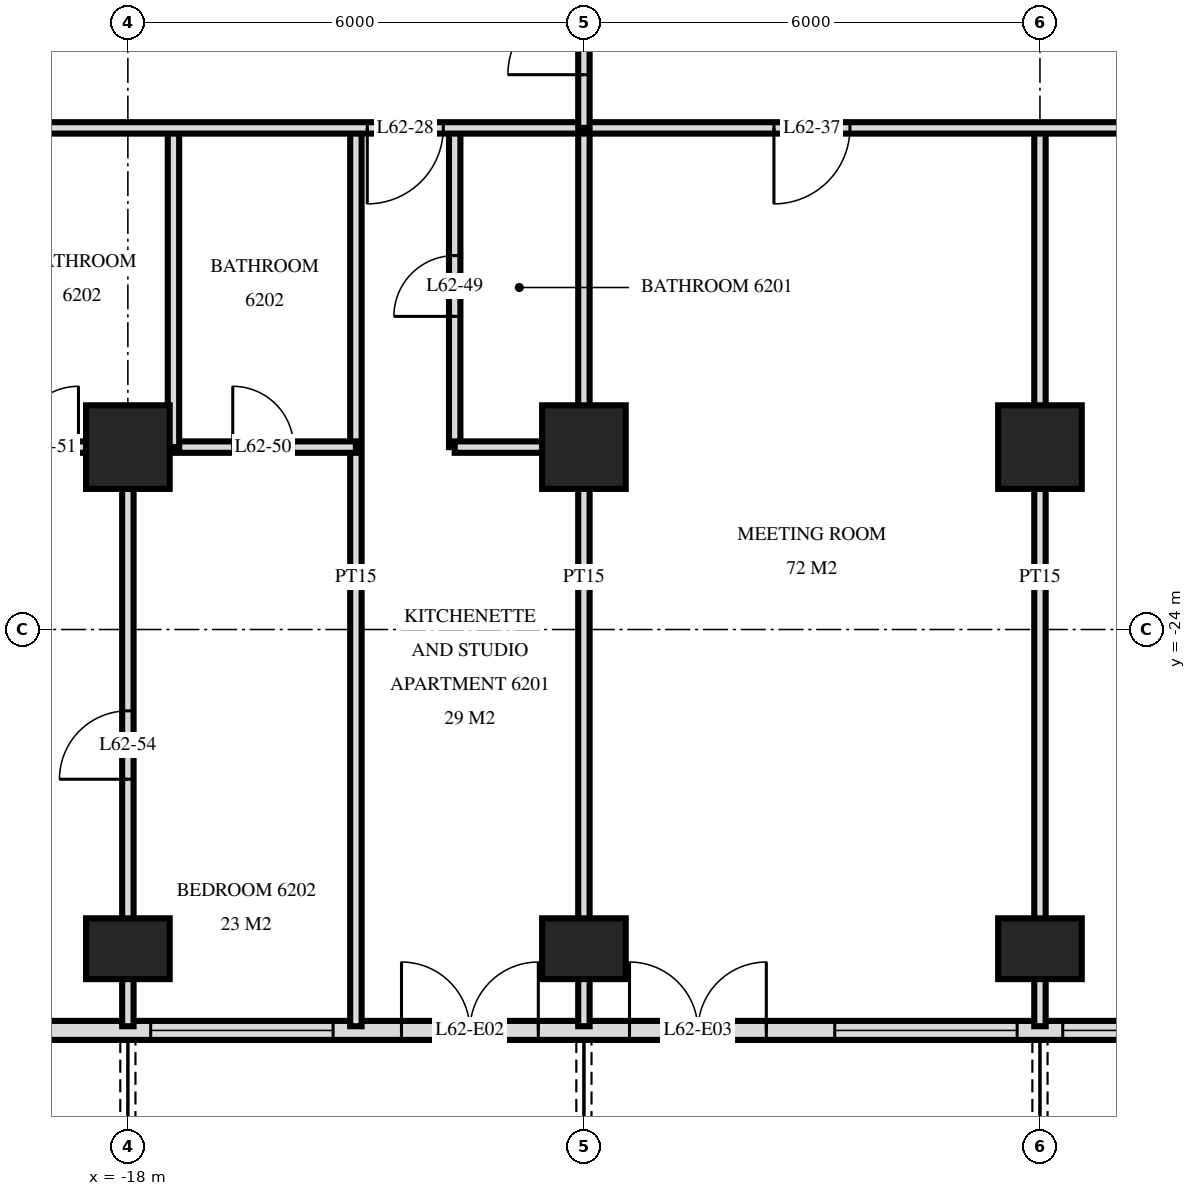
"""IFC4 building model, lengths in metres.
Left out: names, types, materials, properties, quantities, classifications, styles, units other than length and angle.
Written with IfcOpenShell. Run it as: python <this file> out.ifc"""

import sys

from ifc_helpers import new_model, si_unit, direction, frame, frame_2d, origin, origin_2d, place, context, subcontext, project, spatial, rectangle, extrude, element, fill, save


model = new_model("IFC4")
c1 = context("Model", 3, precision=1e-05, world=origin(), true_north=direction((0.0, 1.0)))
c2 = subcontext(c1, "Body", "Model", "MODEL_VIEW")
j1 = project(units=[si_unit("LENGTHUNIT", "METRE"), si_unit("PLANEANGLEUNIT", "RADIAN")], contexts=[c1])
p1 = place(None, origin())
s1 = spatial("IfcSite", under=j1, at=p1, CompositionType="ELEMENT")
p2 = place(p1, origin())
s2 = spatial("IfcBuilding", under=s1, at=p2, CompositionType="ELEMENT")
p3 = place(p2, frame((0.0, 0.0, 236.1)))
s3 = spatial("IfcBuildingStorey", under=s2, at=p3, CompositionType="ELEMENT", Elevation=236.1)
p4 = place(p3, frame((-18.0, -28.2, 0.0), z_axis=(0.0, 0.0, 1.0), x_axis=(1.0, 0.0, 0.0)))
e1 = element("IfcColumn", 1, at=p4, inside=s3, PredefinedType="COLUMN", context=c2, shape_type="SweptSolid", body=[
    extrude(rectangle(XDim=1.1, YDim=0.8, at=origin_2d()), origin(), (0.0, 0.0, 1.0), 3.5),
])
p5 = place(p3, frame((-18.0, -21.6, 0.0), z_axis=(0.0, 0.0, 1.0), x_axis=(1.0, 0.0, 0.0)))
e2 = element("IfcColumn", 2, at=p5, inside=s3, PredefinedType="COLUMN", context=c2, shape_type="SweptSolid", body=[
    extrude(rectangle(XDim=1.1, YDim=1.1, at=origin_2d()), origin(), (0.0, 0.0, 1.0), 3.5),
])
p6 = place(p3, frame((-12.0, -28.2, 0.0), z_axis=(0.0, 0.0, 1.0), x_axis=(1.0, 0.0, 0.0)))
e3 = element("IfcColumn", 3, at=p6, inside=s3, PredefinedType="COLUMN", context=c2, shape_type="SweptSolid", body=[
    extrude(rectangle(XDim=1.1, YDim=0.8, at=origin_2d()), origin(), (0.0, 0.0, 1.0), 3.5),
])
p7 = place(p3, frame((-12.0, -21.6, 0.0), z_axis=(0.0, 0.0, 1.0), x_axis=(1.0, 0.0, 0.0)))
e4 = element("IfcColumn", 4, at=p7, inside=s3, PredefinedType="COLUMN", context=c2, shape_type="SweptSolid", body=[
    extrude(rectangle(XDim=1.1, YDim=1.1, at=origin_2d()), origin(), (0.0, 0.0, 1.0), 3.5),
])
p8 = place(p3, frame((-6.0, -28.2, 0.0), z_axis=(0.0, 0.0, 1.0), x_axis=(1.0, 0.0, 0.0)))
e5 = element("IfcColumn", 5, at=p8, inside=s3, PredefinedType="COLUMN", context=c2, shape_type="SweptSolid", body=[
    extrude(rectangle(XDim=1.1, YDim=0.8, at=origin_2d()), origin(), (0.0, 0.0, 1.0), 3.5),
])
p9 = place(p3, frame((-6.0, -21.6, 0.0), z_axis=(0.0, 0.0, 1.0), x_axis=(1.0, 0.0, 0.0)))
e6 = element("IfcColumn", 6, at=p9, inside=s3, PredefinedType="COLUMN", context=c2, shape_type="SweptSolid", body=[
    extrude(rectangle(XDim=1.1, YDim=1.1, at=origin_2d()), origin(), (0.0, 0.0, 1.0), 3.5),
])
p10 = place(p3, frame((-22.475, -29.275, 0.0), z_axis=(0.0, 0.0, 1.0), x_axis=(1.0, 0.0, 0.0)))
e7 = element("IfcWall", 7, at=p10, inside=s3, PredefinedType="SOLIDWALL", context=c2, shape_type="SweptSolid", body=[
    extrude(rectangle(XDim=44.951, YDim=0.25, at=frame_2d((22.475, 0.0))), origin(), (0.0, 0.0, 1.0), 3.22),
])
p11 = place(p10, frame((0.575, 0.0, 0.0)))
e8 = element("IfcOpeningElement", 8, at=p11, cuts=e7, PredefinedType="OPENING", context=c2, shape_type="SweptSolid", body=[
    extrude(rectangle(XDim=1.8, YDim=2.4, at=frame_2d((0.9, 1.2))), frame((0.0, 0.135, 0.0), z_axis=(0.0, -1.0, 0.0), x_axis=(1.0, 0.0, 0.0)), (0.0, 0.0, 1.0), 0.27),
])
p12 = place(p10, frame((4.775, 0.0, 0.9)))
e9 = element("IfcOpeningElement", 9, at=p12, cuts=e7, PredefinedType="OPENING", context=c2, shape_type="SweptSolid", body=[
    extrude(rectangle(XDim=2.4, YDim=1.5, at=frame_2d((1.2, 0.75))), frame((0.0, 0.135, 0.0), z_axis=(0.0, -1.0, 0.0), x_axis=(1.0, 0.0, 0.0)), (0.0, 0.0, 1.0), 0.27),
])
p13 = place(p10, frame((8.075, 0.0, 0.0)))
e10 = element("IfcOpeningElement", 10, at=p13, cuts=e7, PredefinedType="OPENING", context=c2, shape_type="SweptSolid", body=[
    extrude(rectangle(XDim=1.8, YDim=2.4, at=frame_2d((0.9, 1.2))), frame((0.0, 0.135, 0.0), z_axis=(0.0, -1.0, 0.0), x_axis=(1.0, 0.0, 0.0)), (0.0, 0.0, 1.0), 0.27),
])
p14 = place(p10, frame((11.075, 0.0, 0.0)))
e11 = element("IfcOpeningElement", 11, at=p14, cuts=e7, PredefinedType="OPENING", context=c2, shape_type="SweptSolid", body=[
    extrude(rectangle(XDim=1.8, YDim=2.4, at=frame_2d((0.9, 1.2))), frame((0.0, 0.135, 0.0), z_axis=(0.0, -1.0, 0.0), x_axis=(1.0, 0.0, 0.0)), (0.0, 0.0, 1.0), 0.27),
])
p15 = place(p10, frame((13.775, 0.0, 0.9)))
e12 = element("IfcOpeningElement", 12, at=p15, cuts=e7, PredefinedType="OPENING", context=c2, shape_type="SweptSolid", body=[
    extrude(rectangle(XDim=2.4, YDim=1.5, at=frame_2d((1.2, 0.75))), frame((0.0, 0.135, 0.0), z_axis=(0.0, -1.0, 0.0), x_axis=(1.0, 0.0, 0.0)), (0.0, 0.0, 1.0), 0.27),
])
p16 = place(p10, frame((16.775, 0.0, 0.9)))
e13 = element("IfcOpeningElement", 13, at=p16, cuts=e7, PredefinedType="OPENING", context=c2, shape_type="SweptSolid", body=[
    extrude(rectangle(XDim=2.4, YDim=1.5, at=frame_2d((1.2, 0.75))), frame((0.0, 0.135, 0.0), z_axis=(0.0, -1.0, 0.0), x_axis=(1.0, 0.0, 0.0)), (0.0, 0.0, 1.0), 0.27),
])
p17 = place(p10, frame((20.075, 0.0, 0.0)))
e14 = element("IfcOpeningElement", 14, at=p17, cuts=e7, PredefinedType="OPENING", context=c2, shape_type="SweptSolid", body=[
    extrude(rectangle(XDim=1.8, YDim=2.4, at=frame_2d((0.9, 1.2))), frame((0.0, 0.135, 0.0), z_axis=(0.0, -1.0, 0.0), x_axis=(1.0, 0.0, 0.0)), (0.0, 0.0, 1.0), 0.27),
])
p18 = place(p10, frame((23.075, 0.0, 0.0)))
e15 = element("IfcOpeningElement", 15, at=p18, cuts=e7, PredefinedType="OPENING", context=c2, shape_type="SweptSolid", body=[
    extrude(rectangle(XDim=1.8, YDim=2.4, at=frame_2d((0.9, 1.2))), frame((0.0, 0.135, 0.0), z_axis=(0.0, -1.0, 0.0), x_axis=(1.0, 0.0, 0.0)), (0.0, 0.0, 1.0), 0.27),
])
p19 = place(p10, frame((25.775, 0.0, 0.9)))
e16 = element("IfcOpeningElement", 16, at=p19, cuts=e7, PredefinedType="OPENING", context=c2, shape_type="SweptSolid", body=[
    extrude(rectangle(XDim=2.4, YDim=1.5, at=frame_2d((1.2, 0.75))), frame((0.0, 0.135, 0.0), z_axis=(0.0, -1.0, 0.0), x_axis=(1.0, 0.0, 0.0)), (0.0, 0.0, 1.0), 0.27),
])
p20 = place(p10, frame((29.075, 0.0, 0.0)))
e17 = element("IfcOpeningElement", 17, at=p20, cuts=e7, PredefinedType="OPENING", context=c2, shape_type="SweptSolid", body=[
    extrude(rectangle(XDim=1.8, YDim=2.4, at=frame_2d((0.9, 1.2))), frame((0.0, 0.135, 0.0), z_axis=(0.0, -1.0, 0.0), x_axis=(1.0, 0.0, 0.0)), (0.0, 0.0, 1.0), 0.27),
])
p21 = place(p10, frame((31.775, 0.0, 0.9)))
e18 = element("IfcOpeningElement", 18, at=p21, cuts=e7, PredefinedType="OPENING", context=c2, shape_type="SweptSolid", body=[
    extrude(rectangle(XDim=2.4, YDim=1.5, at=frame_2d((1.2, 0.75))), frame((0.0, 0.135, 0.0), z_axis=(0.0, -1.0, 0.0), x_axis=(1.0, 0.0, 0.0)), (0.0, 0.0, 1.0), 0.27),
])
p22 = place(p10, frame((35.075, 0.0, 0.0)))
e19 = element("IfcOpeningElement", 19, at=p22, cuts=e7, PredefinedType="OPENING", context=c2, shape_type="SweptSolid", body=[
    extrude(rectangle(XDim=1.8, YDim=2.4, at=frame_2d((0.9, 1.2))), frame((0.0, 0.135, 0.0), z_axis=(0.0, -1.0, 0.0), x_axis=(1.0, 0.0, 0.0)), (0.0, 0.0, 1.0), 0.27),
])
p23 = place(p10, frame((41.075, 0.0, 0.0)))
e20 = element("IfcOpeningElement", 20, at=p23, cuts=e7, PredefinedType="OPENING", context=c2, shape_type="SweptSolid", body=[
    extrude(rectangle(XDim=1.8, YDim=2.4, at=frame_2d((0.9, 1.2))), frame((0.0, 0.135, 0.0), z_axis=(0.0, -1.0, 0.0), x_axis=(1.0, 0.0, 0.0)), (0.0, 0.0, 1.0), 0.27),
])
p24 = place(p3, frame((-6.0, -29.22, 0.0), z_axis=(0.0, 0.0, 1.0), x_axis=(0.0, 1.0, 0.0)))
e21 = element("IfcWall", 21, at=p24, inside=s3, PredefinedType="PARTITIONING", context=c2, shape_type="SweptSolid", body=[
    extrude(rectangle(XDim=11.82, YDim=0.15, at=frame_2d((5.91, 0.0))), origin(), (0.0, 0.0, 1.0), 3.22),
])
p25 = place(p3, frame((-12.0, -17.4, 0.0), z_axis=(0.0, 0.0, 1.0), x_axis=(0.0, 1.0, 0.0)))
e22 = element("IfcWall", 22, at=p25, inside=s3, PredefinedType="PARTITIONING", context=c2, shape_type="SweptSolid", body=[
    extrude(rectangle(XDim=2.35, YDim=0.15, at=frame_2d((1.175, 0.0))), origin(), (0.0, 0.0, 1.0), 3.22),
])
p26 = place(p25, frame((0.7, 0.0, 0.0)))
e23 = element("IfcOpeningElement", 23, at=p26, cuts=e22, PredefinedType="OPENING", context=c2, shape_type="SweptSolid", body=[
    extrude(rectangle(XDim=1.0, YDim=2.1, at=frame_2d((0.5, 1.05))), frame((0.0, 0.085, 0.0), z_axis=(0.0, -1.0, 0.0), x_axis=(1.0, 0.0, 0.0)), (0.0, 0.0, 1.0), 0.17),
])
p27 = place(p3, frame((-12.0, -29.22, 0.0), z_axis=(0.0, 0.0, 1.0), x_axis=(0.0, 1.0, 0.0)))
e24 = element("IfcWall", 24, at=p27, inside=s3, PredefinedType="PARTITIONING", context=c2, shape_type="SweptSolid", body=[
    extrude(rectangle(XDim=11.82, YDim=0.15, at=frame_2d((5.91, 0.0))), origin(), (0.0, 0.0, 1.0), 3.22),
])
p28 = place(p3, frame((-13.7, -21.6, 0.0), z_axis=(0.0, 0.0, 1.0), x_axis=(0.0, 1.0, 0.0)))
e25 = element("IfcWall", 25, at=p28, inside=s3, PredefinedType="PARTITIONING", context=c2, shape_type="SweptSolid", body=[
    extrude(rectangle(XDim=4.2, YDim=0.15, at=frame_2d((2.1, 0.0))), origin(), (0.0, 0.0, 1.0), 3.22),
])
p29 = place(p28, frame((1.72, 0.0, 0.0)))
e26 = element("IfcOpeningElement", 26, at=p29, cuts=e25, PredefinedType="OPENING", context=c2, shape_type="SweptSolid", body=[
    extrude(rectangle(XDim=0.8, YDim=2.1, at=frame_2d((0.4, 1.05))), frame((0.0, 0.085, 0.0), z_axis=(0.0, -1.0, 0.0), x_axis=(1.0, 0.0, 0.0)), (0.0, 0.0, 1.0), 0.17),
])
p30 = place(p3, frame((-15.0, -29.22, 0.0), z_axis=(0.0, 0.0, 1.0), x_axis=(0.0, 1.0, 0.0)))
e27 = element("IfcWall", 27, at=p30, inside=s3, PredefinedType="PARTITIONING", context=c2, shape_type="SweptSolid", body=[
    extrude(rectangle(XDim=11.82, YDim=0.15, at=frame_2d((5.91, 0.0))), origin(), (0.0, 0.0, 1.0), 3.22),
])
p31 = place(p3, frame((-17.4, -21.6, 0.0), z_axis=(0.0, 0.0, 1.0), x_axis=(0.0, 1.0, 0.0)))
e28 = element("IfcWall", 28, at=p31, inside=s3, PredefinedType="PARTITIONING", context=c2, shape_type="SweptSolid", body=[
    extrude(rectangle(XDim=4.2, YDim=0.15, at=frame_2d((2.1, 0.0))), origin(), (0.0, 0.0, 1.0), 3.22),
])
p32 = place(p3, frame((-18.0, -29.22, 0.0), z_axis=(0.0, 0.0, 1.0), x_axis=(0.0, 1.0, 0.0)))
e29 = element("IfcWall", 29, at=p32, inside=s3, PredefinedType="PARTITIONING", context=c2, shape_type="SweptSolid", body=[
    extrude(rectangle(XDim=7.62, YDim=0.15, at=frame_2d((3.81, 0.0))), origin(), (0.0, 0.0, 1.0), 3.22),
])
p33 = place(p32, frame((3.25, 0.0, 0.0)))
e30 = element("IfcOpeningElement", 30, at=p33, cuts=e29, PredefinedType="OPENING", context=c2, shape_type="SweptSolid", body=[
    extrude(rectangle(XDim=0.9, YDim=2.1, at=frame_2d((0.45, 1.05))), frame((0.0, 0.085, 0.0), z_axis=(0.0, -1.0, 0.0), x_axis=(1.0, 0.0, 0.0)), (0.0, 0.0, 1.0), 0.17),
])
p34 = place(p3, frame((-21.4, -21.6, 0.0), z_axis=(0.0, 0.0, 1.0), x_axis=(1.0, 0.0, 0.0)))
e31 = element("IfcWall", 31, at=p34, inside=s3, PredefinedType="PARTITIONING", context=c2, shape_type="SweptSolid", body=[
    extrude(rectangle(XDim=6.4, YDim=0.15, at=frame_2d((3.2, 0.0))), origin(), (0.0, 0.0, 1.0), 3.22),
])
p35 = place(p34, frame((4.78, 0.0, 0.0)))
e32 = element("IfcOpeningElement", 32, at=p35, cuts=e31, PredefinedType="OPENING", context=c2, shape_type="SweptSolid", body=[
    extrude(rectangle(XDim=0.8, YDim=2.1, at=frame_2d((0.4, 1.05))), frame((0.0, 0.085, 0.0), z_axis=(0.0, -1.0, 0.0), x_axis=(1.0, 0.0, 0.0)), (0.0, 0.0, 1.0), 0.17),
])
p36 = place(p34, frame((1.95, 0.0, 0.0)))
e33 = element("IfcOpeningElement", 33, at=p36, cuts=e31, PredefinedType="OPENING", context=c2, shape_type="SweptSolid", body=[
    extrude(rectangle(XDim=0.8, YDim=2.1, at=frame_2d((0.4, 1.05))), frame((0.0, 0.085, 0.0), z_axis=(0.0, -1.0, 0.0), x_axis=(1.0, 0.0, 0.0)), (0.0, 0.0, 1.0), 0.17),
])
p37 = place(p3, frame((-13.7, -21.6, 0.0), z_axis=(0.0, 0.0, 1.0), x_axis=(1.0, 0.0, 0.0)))
e34 = element("IfcWall", 34, at=p37, inside=s3, PredefinedType="PARTITIONING", context=c2, shape_type="SweptSolid", body=[
    extrude(rectangle(XDim=1.7, YDim=0.15, at=frame_2d((0.85, 0.0))), origin(), (0.0, 0.0, 1.0), 3.22),
])
p38 = place(p3, frame((-26.82, -17.4, 0.0), z_axis=(0.0, 0.0, 1.0), x_axis=(1.0, 0.0, 0.0)))
e35 = element("IfcWall", 35, at=p38, inside=s3, PredefinedType="PARTITIONING", context=c2, shape_type="SweptSolid", body=[
    extrude(rectangle(XDim=53.64, YDim=0.15, at=frame_2d((26.82, 0.0))), origin(), (0.0, 0.0, 1.0), 3.22),
])
p39 = place(p38, frame((11.97, 0.0, 0.0)))
e36 = element("IfcOpeningElement", 36, at=p39, cuts=e35, PredefinedType="OPENING", context=c2, shape_type="SweptSolid", body=[
    extrude(rectangle(XDim=1.0, YDim=2.1, at=frame_2d((0.5, 1.05))), frame((0.0, 0.085, 0.0), z_axis=(0.0, -1.0, 0.0), x_axis=(1.0, 0.0, 0.0)), (0.0, 0.0, 1.0), 0.17),
])
p40 = place(p38, frame((3.92, 0.0, 0.0)))
e37 = element("IfcOpeningElement", 37, at=p40, cuts=e35, PredefinedType="OPENING", context=c2, shape_type="SweptSolid", body=[
    extrude(rectangle(XDim=1.0, YDim=2.1, at=frame_2d((0.5, 1.05))), frame((0.0, 0.085, 0.0), z_axis=(0.0, -1.0, 0.0), x_axis=(1.0, 0.0, 0.0)), (0.0, 0.0, 1.0), 0.17),
])
p41 = place(p38, frame((5.72, 0.0, 0.0)))
e38 = element("IfcOpeningElement", 38, at=p41, cuts=e35, PredefinedType="OPENING", context=c2, shape_type="SweptSolid", body=[
    extrude(rectangle(XDim=1.0, YDim=2.1, at=frame_2d((0.5, 1.05))), frame((0.0, 0.085, 0.0), z_axis=(0.0, -1.0, 0.0), x_axis=(1.0, 0.0, 0.0)), (0.0, 0.0, 1.0), 0.17),
])
p42 = place(p38, frame((47.72, 0.0, 0.0)))
e39 = element("IfcOpeningElement", 39, at=p42, cuts=e35, PredefinedType="OPENING", context=c2, shape_type="SweptSolid", body=[
    extrude(rectangle(XDim=1.0, YDim=2.1, at=frame_2d((0.5, 1.05))), frame((0.0, 0.085, 0.0), z_axis=(0.0, -1.0, 0.0), x_axis=(1.0, 0.0, 0.0)), (0.0, 0.0, 1.0), 0.17),
])
p43 = place(p38, frame((51.02, 0.0, 0.0)))
e40 = element("IfcOpeningElement", 40, at=p43, cuts=e35, PredefinedType="OPENING", context=c2, shape_type="SweptSolid", body=[
    extrude(rectangle(XDim=1.0, YDim=2.1, at=frame_2d((0.5, 1.05))), frame((0.0, 0.085, 0.0), z_axis=(0.0, -1.0, 0.0), x_axis=(1.0, 0.0, 0.0)), (0.0, 0.0, 1.0), 0.17),
])
p44 = place(p38, frame((17.32, 0.0, 0.0)))
e41 = element("IfcOpeningElement", 41, at=p44, cuts=e35, PredefinedType="OPENING", context=c2, shape_type="SweptSolid", body=[
    extrude(rectangle(XDim=1.0, YDim=2.1, at=frame_2d((0.5, 1.05))), frame((0.0, 0.085, 0.0), z_axis=(0.0, -1.0, 0.0), x_axis=(1.0, 0.0, 0.0)), (0.0, 0.0, 1.0), 0.17),
])
p45 = place(p38, frame((23.32, 0.0, 0.0)))
e42 = element("IfcOpeningElement", 42, at=p45, cuts=e35, PredefinedType="OPENING", context=c2, shape_type="SweptSolid", body=[
    extrude(rectangle(XDim=1.0, YDim=2.1, at=frame_2d((0.5, 1.05))), frame((0.0, 0.085, 0.0), z_axis=(0.0, -1.0, 0.0), x_axis=(1.0, 0.0, 0.0)), (0.0, 0.0, 1.0), 0.17),
])
p46 = place(p38, frame((29.32, 0.0, 0.0)))
e43 = element("IfcOpeningElement", 43, at=p46, cuts=e35, PredefinedType="OPENING", context=c2, shape_type="SweptSolid", body=[
    extrude(rectangle(XDim=1.0, YDim=2.1, at=frame_2d((0.5, 1.05))), frame((0.0, 0.085, 0.0), z_axis=(0.0, -1.0, 0.0), x_axis=(1.0, 0.0, 0.0)), (0.0, 0.0, 1.0), 0.17),
])
p47 = place(p38, frame((35.32, 0.0, 0.0)))
e44 = element("IfcOpeningElement", 44, at=p47, cuts=e35, PredefinedType="OPENING", context=c2, shape_type="SweptSolid", body=[
    extrude(rectangle(XDim=1.0, YDim=2.1, at=frame_2d((0.5, 1.05))), frame((0.0, 0.085, 0.0), z_axis=(0.0, -1.0, 0.0), x_axis=(1.0, 0.0, 0.0)), (0.0, 0.0, 1.0), 0.17),
])
p48 = place(p12, origin())
e45 = element("IfcWindow", 45, at=p48, inside=s3, PartitioningType="SINGLE_PANEL", PredefinedType="WINDOW", context=c2, shape_type="SweptSolid", body=[
    extrude(rectangle(XDim=2.4, YDim=1.5, at=frame_2d((1.2, 0.75))), frame((0.0, 0.03, 0.0), z_axis=(0.0, -1.0, 0.0), x_axis=(1.0, 0.0, 0.0)), (0.0, 0.0, 1.0), 0.06),
])
fill(e9, e45)
p49 = place(p13, origin())
e46 = element("IfcDoor", 46, at=p49, inside=s3, OperationType="DOUBLE_DOOR_SINGLE_SWING", PredefinedType="DOOR", context=c2, shape_type="SweptSolid", body=[
    extrude(rectangle(XDim=1.8, YDim=2.4, at=frame_2d((0.9, 1.2))), frame((0.0, 0.025, 0.0), z_axis=(0.0, -1.0, 0.0), x_axis=(1.0, 0.0, 0.0)), (0.0, 0.0, 1.0), 0.05),
])
fill(e10, e46)
p50 = place(p14, origin())
e47 = element("IfcDoor", 47, at=p50, inside=s3, OperationType="DOUBLE_DOOR_SINGLE_SWING", PredefinedType="DOOR", context=c2, shape_type="SweptSolid", body=[
    extrude(rectangle(XDim=1.8, YDim=2.4, at=frame_2d((0.9, 1.2))), frame((0.0, 0.025, 0.0), z_axis=(0.0, -1.0, 0.0), x_axis=(1.0, 0.0, 0.0)), (0.0, 0.0, 1.0), 0.05),
])
fill(e11, e47)
p51 = place(p15, origin())
e48 = element("IfcWindow", 48, at=p51, inside=s3, PartitioningType="SINGLE_PANEL", PredefinedType="WINDOW", context=c2, shape_type="SweptSolid", body=[
    extrude(rectangle(XDim=2.4, YDim=1.5, at=frame_2d((1.2, 0.75))), frame((0.0, 0.03, 0.0), z_axis=(0.0, -1.0, 0.0), x_axis=(1.0, 0.0, 0.0)), (0.0, 0.0, 1.0), 0.06),
])
fill(e12, e48)
p52 = place(p16, origin())
e49 = element("IfcWindow", 49, at=p52, inside=s3, PartitioningType="SINGLE_PANEL", PredefinedType="WINDOW", context=c2, shape_type="SweptSolid", body=[
    extrude(rectangle(XDim=2.4, YDim=1.5, at=frame_2d((1.2, 0.75))), frame((0.0, 0.03, 0.0), z_axis=(0.0, -1.0, 0.0), x_axis=(1.0, 0.0, 0.0)), (0.0, 0.0, 1.0), 0.06),
])
fill(e13, e49)
p53 = place(p26, origin())
e50 = element("IfcDoor", 50, at=p53, inside=s3, OperationType="SINGLE_SWING_RIGHT", PredefinedType="DOOR", context=c2, shape_type="SweptSolid", body=[
    extrude(rectangle(XDim=1.0, YDim=2.1, at=frame_2d((0.5, 1.05))), frame((0.0, 0.025, 0.0), z_axis=(0.0, -1.0, 0.0), x_axis=(1.0, 0.0, 0.0)), (0.0, 0.0, 1.0), 0.05),
])
fill(e23, e50)
p54 = place(p39, frame((0.5, 0.0, 0.0), z_axis=(0.0, 0.0, 1.0), x_axis=(-1.0, 0.0, 0.0)))
e51 = element("IfcDoor", 51, at=p54, inside=s3, OperationType="SINGLE_SWING_LEFT", PredefinedType="DOOR", context=c2, shape_type="SweptSolid", body=[
    extrude(rectangle(XDim=1.0, YDim=2.1, at=frame_2d((0.0, 1.05))), frame((0.0, -0.025, 0.0), z_axis=(0.0, 1.0, 0.0), x_axis=(-1.0, 0.0, 0.0)), (0.0, 0.0, 1.0), 0.05),
])
fill(e36, e51)
p55 = place(p44, frame((0.5, 0.0, 0.0), z_axis=(0.0, 0.0, 1.0), x_axis=(-1.0, 0.0, 0.0)))
e52 = element("IfcDoor", 52, at=p55, inside=s3, OperationType="SINGLE_SWING_LEFT", PredefinedType="DOOR", context=c2, shape_type="SweptSolid", body=[
    extrude(rectangle(XDim=1.0, YDim=2.1, at=frame_2d((0.0, 1.05))), frame((0.0, -0.025, 0.0), z_axis=(0.0, 1.0, 0.0), x_axis=(-1.0, 0.0, 0.0)), (0.0, 0.0, 1.0), 0.05),
])
fill(e41, e52)
p56 = place(p29, origin())
e53 = element("IfcDoor", 53, at=p56, inside=s3, OperationType="SINGLE_SWING_RIGHT", PredefinedType="DOOR", context=c2, shape_type="SweptSolid", body=[
    extrude(rectangle(XDim=0.8, YDim=2.1, at=frame_2d((0.4, 1.05))), frame((0.0, 0.025, 0.0), z_axis=(0.0, -1.0, 0.0), x_axis=(1.0, 0.0, 0.0)), (0.0, 0.0, 1.0), 0.05),
])
fill(e26, e53)
p57 = place(p35, origin())
e54 = element("IfcDoor", 54, at=p57, inside=s3, OperationType="SINGLE_SWING_RIGHT", PredefinedType="DOOR", context=c2, shape_type="SweptSolid", body=[
    extrude(rectangle(XDim=0.8, YDim=2.1, at=frame_2d((0.4, 1.05))), frame((0.0, 0.025, 0.0), z_axis=(0.0, -1.0, 0.0), x_axis=(1.0, 0.0, 0.0)), (0.0, 0.0, 1.0), 0.05),
])
fill(e32, e54)
p58 = place(p36, origin())
e55 = element("IfcDoor", 55, at=p58, inside=s3, OperationType="SINGLE_SWING_LEFT", PredefinedType="DOOR", context=c2, shape_type="SweptSolid", body=[
    extrude(rectangle(XDim=0.8, YDim=2.1, at=frame_2d((0.4, 1.05))), frame((0.0, 0.025, 0.0), z_axis=(0.0, -1.0, 0.0), x_axis=(1.0, 0.0, 0.0)), (0.0, 0.0, 1.0), 0.05),
])
fill(e33, e55)
p59 = place(p33, origin())
e56 = element("IfcDoor", 56, at=p59, inside=s3, OperationType="SINGLE_SWING_RIGHT", PredefinedType="DOOR", context=c2, shape_type="SweptSolid", body=[
    extrude(rectangle(XDim=0.9, YDim=2.1, at=frame_2d((0.45, 1.05))), frame((0.0, 0.025, 0.0), z_axis=(0.0, -1.0, 0.0), x_axis=(1.0, 0.0, 0.0)), (0.0, 0.0, 1.0), 0.05),
])
fill(e30, e56)
save(model, sys.argv[1])
